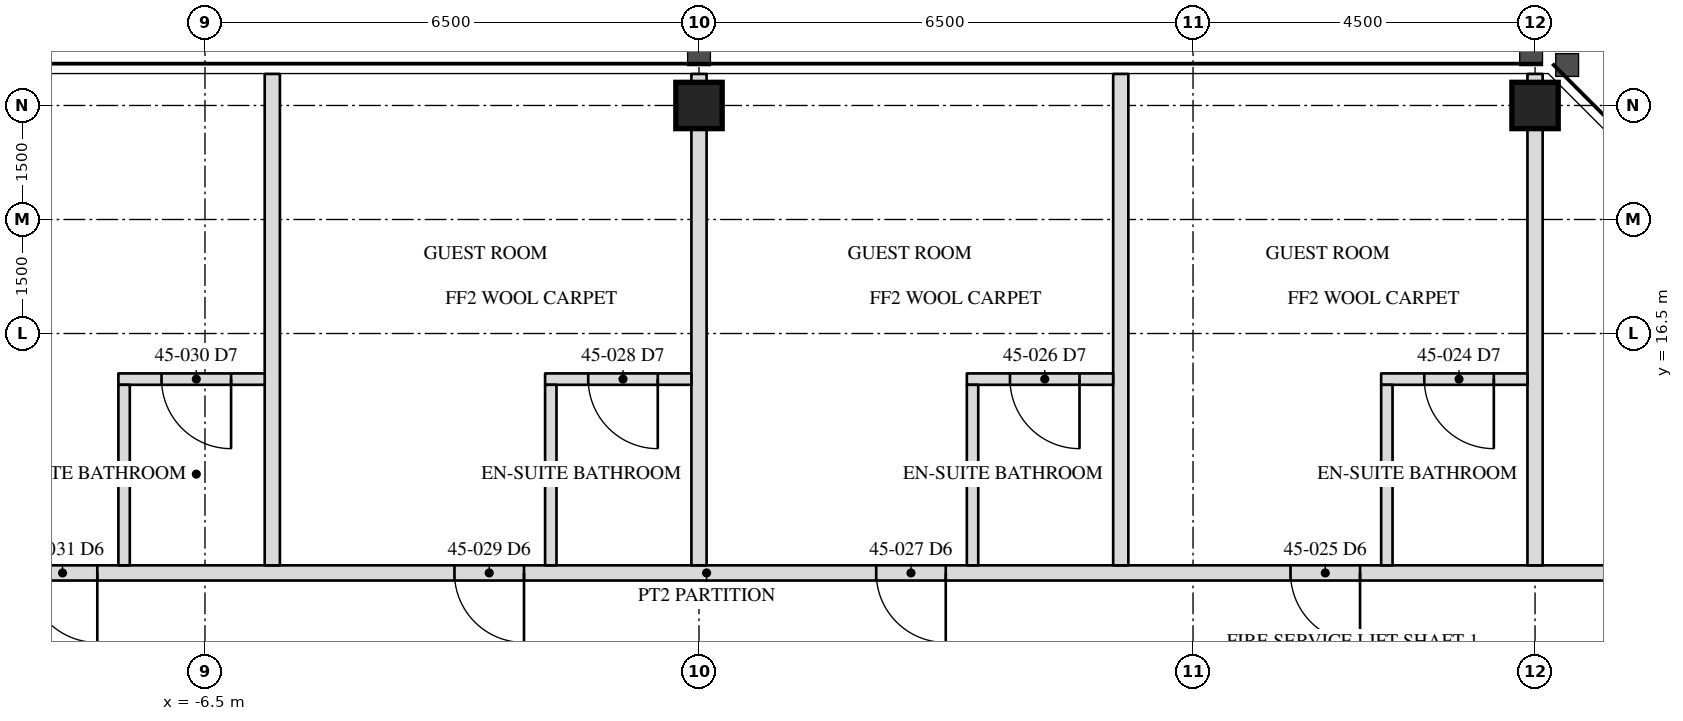
"""IFC4 building model, lengths in metres.
Left out: names, types, materials, properties, quantities, classifications, styles, units other than length and angle.
Written with IfcOpenShell. Run it as: python <this file> out.ifc"""

import sys

from ifc_helpers import new_model, si_unit, direction, frame, frame_2d, origin, origin_2d, place, context, subcontext, project, spatial, rectangle, hollow_rectangle, extrude, element, fill, save


model = new_model("IFC4")
c1 = context("Model", 3, precision=1e-05, world=origin(), true_north=direction((0.0, 1.0)))
c2 = subcontext(c1, "Body", "Model", "MODEL_VIEW")
j1 = project(units=[si_unit("LENGTHUNIT", "METRE"), si_unit("PLANEANGLEUNIT", "RADIAN")], contexts=[c1])
p1 = place(None, origin())
s1 = spatial("IfcSite", under=j1, at=p1, CompositionType="ELEMENT")
p2 = place(p1, origin())
s2 = spatial("IfcBuilding", under=s1, at=p2, CompositionType="ELEMENT")
p3 = place(p2, frame((0.0, 0.0, 194.2)))
s3 = spatial("IfcBuildingStorey", under=s2, at=p3, CompositionType="ELEMENT", Elevation=194.2)
for number, where, z_axis, x_axis in (
    (1, (11.0, 19.5, 0.0), (0.0, 0.0, 1.0), (1.0, 0.0, 0.0)),
    (2, (0.0, 19.5, 0.0), (0.0, 0.0, 1.0), (1.0, 0.0, 0.0)),
):
    element("IfcColumn", number, at=place(p3, frame(where, z_axis=z_axis, x_axis=x_axis)), inside=s3, PredefinedType="COLUMN", context=c2, shape_type="SweptSolid", body=[
        extrude(hollow_rectangle(XDim=0.61, YDim=0.61, WallThickness=0.076, at=origin_2d()), origin(), (0.0, 0.0, 1.0), 3.5),
    ])
p4 = place(p3, frame((13.45, 13.35, 0.0), z_axis=(0.0, 0.0, 1.0), x_axis=(-1.0, 0.0, 0.0)))
e3 = element("IfcWall", 3, at=p4, inside=s3, PredefinedType="PARTITIONING", context=c2, shape_type="SweptSolid", body=[
    extrude(rectangle(XDim=26.7, YDim=0.2, at=frame_2d((13.35, 0.0))), origin(), (0.0, 0.0, 1.0), 3.31),
])
p5 = place(p4, frame((4.752, 0.0, 0.0)))
e4 = element("IfcOpeningElement", 4, at=p5, cuts=e3, PredefinedType="OPENING", context=c2, shape_type="SweptSolid", body=[
    extrude(rectangle(XDim=0.915, YDim=2.134, at=frame_2d((0.458, 1.067))), frame((0.0, 0.11, 0.0), z_axis=(0.0, -1.0, 0.0), x_axis=(1.0, 0.0, 0.0)), (0.0, 0.0, 1.0), 0.22),
])
p6 = place(p4, frame((10.204, 0.0, 0.0)))
e5 = element("IfcOpeningElement", 5, at=p6, cuts=e3, PredefinedType="OPENING", context=c2, shape_type="SweptSolid", body=[
    extrude(rectangle(XDim=0.915, YDim=2.134, at=frame_2d((0.458, 1.067))), frame((0.0, 0.11, 0.0), z_axis=(0.0, -1.0, 0.0), x_axis=(1.0, 0.0, 0.0)), (0.0, 0.0, 1.0), 0.22),
])
p7 = place(p4, frame((15.752, 0.0, 0.0)))
e6 = element("IfcOpeningElement", 6, at=p7, cuts=e3, PredefinedType="OPENING", context=c2, shape_type="SweptSolid", body=[
    extrude(rectangle(XDim=0.915, YDim=2.134, at=frame_2d((0.458, 1.067))), frame((0.0, 0.11, 0.0), z_axis=(0.0, -1.0, 0.0), x_axis=(1.0, 0.0, 0.0)), (0.0, 0.0, 1.0), 0.22),
])
p8 = place(p4, frame((21.366, 0.0, 0.0)))
e7 = element("IfcOpeningElement", 7, at=p8, cuts=e3, PredefinedType="OPENING", context=c2, shape_type="SweptSolid", body=[
    extrude(rectangle(XDim=0.915, YDim=2.134, at=frame_2d((0.458, 1.067))), frame((0.0, 0.11, 0.0), z_axis=(0.0, -1.0, 0.0), x_axis=(1.0, 0.0, 0.0)), (0.0, 0.0, 1.0), 0.22),
])
p9 = place(p3, frame((11.0, 13.45, 0.0), z_axis=(0.0, 0.0, 1.0), x_axis=(0.0, 1.0, 0.0)))
e8 = element("IfcWall", 8, at=p9, inside=s3, PredefinedType="PARTITIONING", context=c2, shape_type="SweptSolid", body=[
    extrude(rectangle(XDim=6.465, YDim=0.2, at=frame_2d((3.232, 0.0))), origin(), (0.0, 0.0, 1.0), 2.802),
])
p10 = place(p3, frame((5.549, 13.45, 0.0), z_axis=(0.0, 0.0, 1.0), x_axis=(0.0, 1.0, 0.0)))
e9 = element("IfcWall", 9, at=p10, inside=s3, PredefinedType="PARTITIONING", context=c2, shape_type="SweptSolid", body=[
    extrude(rectangle(XDim=6.465, YDim=0.2, at=frame_2d((3.232, 0.0))), origin(), (0.0, 0.0, 1.0), 3.31),
])
p11 = place(p3, frame((0.0, 13.45, 0.0), z_axis=(0.0, 0.0, 1.0), x_axis=(0.0, 1.0, 0.0)))
e10 = element("IfcWall", 10, at=p11, inside=s3, PredefinedType="PARTITIONING", context=c2, shape_type="SweptSolid", body=[
    extrude(rectangle(XDim=6.465, YDim=0.2, at=frame_2d((3.232, 0.0))), origin(), (0.0, 0.0, 1.0), 2.802),
])
p12 = place(p3, frame((-5.614, 13.45, 0.0), z_axis=(0.0, 0.0, 1.0), x_axis=(0.0, 1.0, 0.0)))
e11 = element("IfcWall", 11, at=p12, inside=s3, PredefinedType="PARTITIONING", context=c2, shape_type="SweptSolid", body=[
    extrude(rectangle(XDim=6.465, YDim=0.2, at=frame_2d((3.232, 0.0))), origin(), (0.0, 0.0, 1.0), 3.31),
])
p13 = place(p3, frame((10.9, 15.9, 0.0), z_axis=(0.0, 0.0, 1.0), x_axis=(-1.0, 0.0, 0.0)))
e12 = element("IfcWall", 12, at=p13, inside=s3, PredefinedType="PARTITIONING", context=c2, shape_type="SweptSolid", body=[
    extrude(rectangle(XDim=1.925, YDim=0.15, at=frame_2d((0.962, 0.0))), origin(), (0.0, 0.0, 1.0), 3.31),
])
p14 = place(p13, frame((0.442, 0.0, 0.0)))
e13 = element("IfcOpeningElement", 13, at=p14, cuts=e12, PredefinedType="OPENING", context=c2, shape_type="SweptSolid", body=[
    extrude(rectangle(XDim=0.915, YDim=2.032, at=frame_2d((0.458, 1.016))), frame((0.0, 0.085, 0.0), z_axis=(0.0, -1.0, 0.0), x_axis=(1.0, 0.0, 0.0)), (0.0, 0.0, 1.0), 0.17),
])
p15 = place(p3, frame((9.05, 13.45, 0.0), z_axis=(0.0, 0.0, 1.0), x_axis=(0.0, 1.0, 0.0)))
e14 = element("IfcWall", 14, at=p15, inside=s3, PredefinedType="PARTITIONING", context=c2, shape_type="SweptSolid", body=[
    extrude(rectangle(XDim=2.375, YDim=0.15, at=frame_2d((1.188, 0.0))), origin(), (0.0, 0.0, 1.0), 3.31),
])
p16 = place(p3, frame((5.449, 15.9, 0.0), z_axis=(0.0, 0.0, 1.0), x_axis=(-1.0, 0.0, 0.0)))
e15 = element("IfcWall", 15, at=p16, inside=s3, PredefinedType="PARTITIONING", context=c2, shape_type="SweptSolid", body=[
    extrude(rectangle(XDim=1.925, YDim=0.15, at=frame_2d((0.962, 0.0))), origin(), (0.0, 0.0, 1.0), 3.31),
])
p17 = place(p16, frame((0.442, 0.0, 0.0)))
e16 = element("IfcOpeningElement", 16, at=p17, cuts=e15, PredefinedType="OPENING", context=c2, shape_type="SweptSolid", body=[
    extrude(rectangle(XDim=0.915, YDim=2.032, at=frame_2d((0.458, 1.016))), frame((0.0, 0.085, 0.0), z_axis=(0.0, -1.0, 0.0), x_axis=(1.0, 0.0, 0.0)), (0.0, 0.0, 1.0), 0.17),
])
p18 = place(p3, frame((3.599, 13.45, 0.0), z_axis=(0.0, 0.0, 1.0), x_axis=(0.0, 1.0, 0.0)))
e17 = element("IfcWall", 17, at=p18, inside=s3, PredefinedType="PARTITIONING", context=c2, shape_type="SweptSolid", body=[
    extrude(rectangle(XDim=2.375, YDim=0.15, at=frame_2d((1.188, 0.0))), origin(), (0.0, 0.0, 1.0), 2.703),
])
p19 = place(p3, frame((-0.1, 15.9, 0.0), z_axis=(0.0, 0.0, 1.0), x_axis=(-1.0, 0.0, 0.0)))
e18 = element("IfcWall", 18, at=p19, inside=s3, PredefinedType="PARTITIONING", context=c2, shape_type="SweptSolid", body=[
    extrude(rectangle(XDim=1.925, YDim=0.15, at=frame_2d((0.962, 0.0))), origin(), (0.0, 0.0, 1.0), 3.31),
])
p20 = place(p19, frame((0.442, 0.0, 0.0)))
e19 = element("IfcOpeningElement", 19, at=p20, cuts=e18, PredefinedType="OPENING", context=c2, shape_type="SweptSolid", body=[
    extrude(rectangle(XDim=0.915, YDim=2.032, at=frame_2d((0.458, 1.016))), frame((0.0, 0.085, 0.0), z_axis=(0.0, -1.0, 0.0), x_axis=(1.0, 0.0, 0.0)), (0.0, 0.0, 1.0), 0.17),
])
p21 = place(p3, frame((-1.95, 13.45, 0.0), z_axis=(0.0, 0.0, 1.0), x_axis=(0.0, 1.0, 0.0)))
e20 = element("IfcWall", 20, at=p21, inside=s3, PredefinedType="PARTITIONING", context=c2, shape_type="SweptSolid", body=[
    extrude(rectangle(XDim=2.375, YDim=0.15, at=frame_2d((1.188, 0.0))), origin(), (0.0, 0.0, 1.0), 3.31),
])
p22 = place(p3, frame((-5.714, 15.9, 0.0), z_axis=(0.0, 0.0, 1.0), x_axis=(-1.0, 0.0, 0.0)))
e21 = element("IfcWall", 21, at=p22, inside=s3, PredefinedType="PARTITIONING", context=c2, shape_type="SweptSolid", body=[
    extrude(rectangle(XDim=1.925, YDim=0.15, at=frame_2d((0.962, 0.0))), origin(), (0.0, 0.0, 1.0), 3.31),
])
p23 = place(p22, frame((0.442, 0.0, 0.0)))
e22 = element("IfcOpeningElement", 22, at=p23, cuts=e21, PredefinedType="OPENING", context=c2, shape_type="SweptSolid", body=[
    extrude(rectangle(XDim=0.915, YDim=2.032, at=frame_2d((0.458, 1.016))), frame((0.0, 0.085, 0.0), z_axis=(0.0, -1.0, 0.0), x_axis=(1.0, 0.0, 0.0)), (0.0, 0.0, 1.0), 0.17),
])
p24 = place(p3, frame((-7.564, 13.45, 0.0), z_axis=(0.0, 0.0, 1.0), x_axis=(0.0, 1.0, 0.0)))
e23 = element("IfcWall", 23, at=p24, inside=s3, PredefinedType="PARTITIONING", context=c2, shape_type="SweptSolid", body=[
    extrude(rectangle(XDim=2.375, YDim=0.15, at=frame_2d((1.188, 0.0))), origin(), (0.0, 0.0, 1.0), 3.31),
])
p25 = place(p14, origin())
e24 = element("IfcDoor", 24, at=p25, inside=s3, OperationType="SINGLE_SWING_LEFT", PredefinedType="DOOR", context=c2, shape_type="SweptSolid", body=[
    extrude(rectangle(XDim=0.915, YDim=2.032, at=frame_2d((0.458, 1.016))), frame((0.0, 0.025, 0.0), z_axis=(0.0, -1.0, 0.0), x_axis=(1.0, 0.0, 0.0)), (0.0, 0.0, 1.0), 0.05),
])
fill(e13, e24)
p26 = place(p5, origin())
e25 = element("IfcDoor", 25, at=p26, inside=s3, OperationType="SINGLE_SWING_LEFT", PredefinedType="DOOR", context=c2, shape_type="SweptSolid", body=[
    extrude(rectangle(XDim=0.915, YDim=2.134, at=frame_2d((0.458, 1.067))), frame((0.0, 0.025, 0.0), z_axis=(0.0, -1.0, 0.0), x_axis=(1.0, 0.0, 0.0)), (0.0, 0.0, 1.0), 0.05),
])
fill(e4, e25)
p27 = place(p17, origin())
e26 = element("IfcDoor", 26, at=p27, inside=s3, OperationType="SINGLE_SWING_LEFT", PredefinedType="DOOR", context=c2, shape_type="SweptSolid", body=[
    extrude(rectangle(XDim=0.915, YDim=2.032, at=frame_2d((0.458, 1.016))), frame((0.0, 0.025, 0.0), z_axis=(0.0, -1.0, 0.0), x_axis=(1.0, 0.0, 0.0)), (0.0, 0.0, 1.0), 0.05),
])
fill(e16, e26)
p28 = place(p6, origin())
e27 = element("IfcDoor", 27, at=p28, inside=s3, OperationType="SINGLE_SWING_LEFT", PredefinedType="DOOR", context=c2, shape_type="SweptSolid", body=[
    extrude(rectangle(XDim=0.915, YDim=2.134, at=frame_2d((0.458, 1.067))), frame((0.0, 0.025, 0.0), z_axis=(0.0, -1.0, 0.0), x_axis=(1.0, 0.0, 0.0)), (0.0, 0.0, 1.0), 0.05),
])
fill(e5, e27)
p29 = place(p20, origin())
e28 = element("IfcDoor", 28, at=p29, inside=s3, OperationType="SINGLE_SWING_LEFT", PredefinedType="DOOR", context=c2, shape_type="SweptSolid", body=[
    extrude(rectangle(XDim=0.915, YDim=2.032, at=frame_2d((0.458, 1.016))), frame((0.0, 0.025, 0.0), z_axis=(0.0, -1.0, 0.0), x_axis=(1.0, 0.0, 0.0)), (0.0, 0.0, 1.0), 0.05),
])
fill(e19, e28)
p30 = place(p7, origin())
e29 = element("IfcDoor", 29, at=p30, inside=s3, OperationType="SINGLE_SWING_LEFT", PredefinedType="DOOR", context=c2, shape_type="SweptSolid", body=[
    extrude(rectangle(XDim=0.915, YDim=2.134, at=frame_2d((0.458, 1.067))), frame((0.0, 0.025, 0.0), z_axis=(0.0, -1.0, 0.0), x_axis=(1.0, 0.0, 0.0)), (0.0, 0.0, 1.0), 0.05),
])
fill(e6, e29)
p31 = place(p23, origin())
e30 = element("IfcDoor", 30, at=p31, inside=s3, OperationType="SINGLE_SWING_LEFT", PredefinedType="DOOR", context=c2, shape_type="SweptSolid", body=[
    extrude(rectangle(XDim=0.915, YDim=2.032, at=frame_2d((0.458, 1.016))), frame((0.0, 0.025, 0.0), z_axis=(0.0, -1.0, 0.0), x_axis=(1.0, 0.0, 0.0)), (0.0, 0.0, 1.0), 0.05),
])
fill(e22, e30)
p32 = place(p8, origin())
e31 = element("IfcDoor", 31, at=p32, inside=s3, OperationType="SINGLE_SWING_LEFT", PredefinedType="DOOR", context=c2, shape_type="SweptSolid", body=[
    extrude(rectangle(XDim=0.915, YDim=2.134, at=frame_2d((0.458, 1.067))), frame((0.0, 0.025, 0.0), z_axis=(0.0, -1.0, 0.0), x_axis=(1.0, 0.0, 0.0)), (0.0, 0.0, 1.0), 0.05),
])
fill(e7, e31)
save(model, sys.argv[1])
